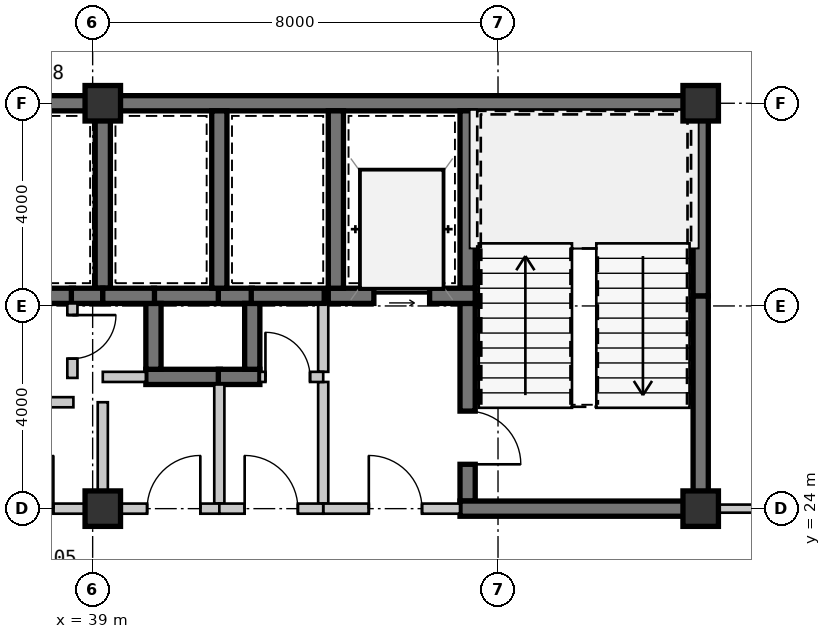
"""IFC4 building model, lengths in metres.
Left out: names, types, materials, properties, quantities, classifications, styles, units other than length and angle.
Written with IfcOpenShell. Run it as: python <this file> out.ifc"""

import sys

from ifc_helpers import new_model, si_unit, direction, frame, frame_2d, origin, origin_2d, place, context, subcontext, project, spatial, rectangle, extrude, source, transform, mapped, element, fill, save


model = new_model("IFC4")
c1 = context("Model", 3, precision=1e-05, world=origin(), true_north=direction((0.0, 1.0)))
c2 = subcontext(c1, "Body", "Model", "MODEL_VIEW")
j1 = project(units=[si_unit("LENGTHUNIT", "METRE"), si_unit("PLANEANGLEUNIT", "RADIAN")], contexts=[c1])
p1 = place(None, origin())
s1 = spatial("IfcSite", under=j1, at=p1, CompositionType="ELEMENT")
p2 = place(p1, origin())
s2 = spatial("IfcBuilding", under=s1, at=p2, CompositionType="ELEMENT")
p3 = place(p2, frame((0.0, 0.0, 80.85)))
s3 = spatial("IfcBuildingStorey", under=s2, at=p3, CompositionType="ELEMENT", Elevation=80.85)
m1 = source(origin(), c2, "Body", "SweptSolid", [
    extrude(rectangle(XDim=0.7, YDim=0.7, at=origin_2d()), origin(), (0.0, 0.0, 1.0), 3.15),
])
for number, where, z_axis, x_axis in (
    (1, (39.2, 24.0, 0.0), (0.0, 0.0, 1.0), (1.0, 0.0, 0.0)),
    (2, (51.0, 24.0, 0.0), (0.0, 0.0, 1.0), (1.0, 0.0, 0.0)),
    (3, (39.2, 32.0, 0.0), (0.0, 0.0, 1.0), (1.0, 0.0, 0.0)),
    (4, (51.0, 32.0, 0.0), (0.0, 0.0, 1.0), (1.0, 0.0, 0.0)),
):
    element("IfcColumn", number, at=place(p3, frame(where, z_axis=z_axis, x_axis=x_axis)), inside=s3, PredefinedType="COLUMN", context=c2, shape_type="MappedRepresentation", body=[
        mapped(m1, transform((0.0, 0.0, 0.0), scale=1.0)),
    ])
m2 = source(origin(), c2, "Body", "SweptSolid", [
    extrude(rectangle(XDim=11.2, YDim=0.3, at=frame_2d((5.6, 0.0))), origin(), (0.0, 0.0, 1.0), 2.93),
])
p4 = place(p3, frame((28.0, 32.0, 0.0), z_axis=(0.0, 0.0, 1.0), x_axis=(1.0, 0.0, 0.0)))
e5 = element("IfcWall", 5, at=p4, inside=s3, PredefinedType="SHEAR", context=c2, shape_type="MappedRepresentation", body=[
    mapped(m2, transform((0.0, 0.0, 0.0), scale=1.0)),
])
m3 = source(origin(), c2, "Body", "SweptSolid", [
    extrude(rectangle(XDim=11.95, YDim=0.3, at=frame_2d((5.975, 0.0))), origin(), (0.0, 0.0, 1.0), 2.93),
])
p5 = place(p3, frame((39.2, 32.0, 0.0), z_axis=(0.0, 0.0, 1.0), x_axis=(1.0, 0.0, 0.0)))
e6 = element("IfcWall", 6, at=p5, inside=s3, PredefinedType="SHEAR", context=c2, shape_type="MappedRepresentation", body=[
    mapped(m3, transform((0.0, 0.0, 0.0), scale=1.0)),
])
m4 = source(origin(), c2, "Body", "SweptSolid", [
    extrude(rectangle(XDim=4.05, YDim=0.3, at=frame_2d((2.025, 0.0))), origin(), (0.0, 0.0, 1.0), 2.93),
])
p6 = place(p3, frame((51.0, 24.15, 0.0), z_axis=(0.0, 0.0, 1.0), x_axis=(0.0, 1.0, 0.0)))
e7 = element("IfcWall", 7, at=p6, inside=s3, PredefinedType="SHEAR", context=c2, shape_type="MappedRepresentation", body=[
    mapped(m4, transform((0.0, 0.0, 0.0), scale=1.0)),
])
m5 = source(origin(), c2, "Body", "SweptSolid", [
    extrude(rectangle(XDim=3.65, YDim=0.3, at=frame_2d((1.825, 0.0))), origin(), (0.0, 0.0, 1.0), 2.93),
])
p7 = place(p3, frame((51.0, 28.2, 0.0), z_axis=(0.0, 0.0, 1.0), x_axis=(0.0, 1.0, 0.0)))
e8 = element("IfcWall", 8, at=p7, inside=s3, PredefinedType="SHEAR", context=c2, shape_type="MappedRepresentation", body=[
    mapped(m5, transform((0.0, 0.0, 0.0), scale=1.0)),
])
m6 = source(origin(), c2, "Body", "SweptSolid", [
    extrude(rectangle(XDim=3.5, YDim=0.3, at=frame_2d((1.75, 0.0))), origin(), (0.0, 0.0, 1.0), 2.93),
])
p8 = place(p3, frame((46.4, 31.85, 0.0), z_axis=(0.0, 0.0, 1.0), x_axis=(0.0, -1.0, 0.0)))
e9 = element("IfcWall", 9, at=p8, inside=s3, PredefinedType="SHEAR", context=c2, shape_type="MappedRepresentation", body=[
    mapped(m6, transform((0.0, 0.0, 0.0), scale=1.0)),
])
m7 = source(origin(), c2, "Body", "SweptSolid", [
    extrude(rectangle(XDim=3.9, YDim=0.3, at=frame_2d((1.95, 0.0))), origin(), (0.0, 0.0, 1.0), 2.93),
])
p9 = place(p3, frame((46.4, 28.05, 0.0), z_axis=(0.0, 0.0, 1.0), x_axis=(0.0, -1.0, 0.0)))
e10 = element("IfcWall", 10, at=p9, inside=s3, PredefinedType="SHEAR", context=c2, shape_type="MappedRepresentation", body=[
    mapped(m7, transform((0.0, 0.0, 0.0), scale=1.0)),
])
m8 = source(origin(), c2, "Body", "SweptSolid", [
    extrude(rectangle(XDim=1.05, YDim=2.1, at=frame_2d((0.525, 1.05))), frame((0.0, 0.16, 0.0), z_axis=(0.0, -1.0, 0.0), x_axis=(1.0, 0.0, 0.0)), (0.0, 0.0, 1.0), 0.32),
])
p10 = place(p9, frame((2.125, 0.0, 0.0)))
e11 = element("IfcOpeningElement", 11, at=p10, cuts=e10, PredefinedType="OPENING", context=c2, shape_type="MappedRepresentation", body=[
    mapped(m8, transform((0.0, 0.0, 0.0), scale=1.0)),
])
m9 = source(origin(), c2, "Body", "SweptSolid", [
    extrude(rectangle(XDim=4.9, YDim=0.3, at=frame_2d((2.45, 0.0))), origin(), (0.0, 0.0, 1.0), 2.93),
])
p11 = place(p3, frame((46.25, 24.0, 0.0), z_axis=(0.0, 0.0, 1.0), x_axis=(1.0, 0.0, 0.0)))
e12 = element("IfcWall", 12, at=p11, inside=s3, PredefinedType="SHEAR", context=c2, shape_type="MappedRepresentation", body=[
    mapped(m9, transform((0.0, 0.0, 0.0), scale=1.0)),
])
m10 = source(origin(), c2, "Body", "SweptSolid", [
    extrude(rectangle(XDim=2.9, YDim=0.3, at=frame_2d((1.45, 0.0))), origin(), (0.0, 0.0, 1.0), 2.93),
])
p12 = place(p3, frame((43.65, 28.2, 0.0), z_axis=(0.0, 0.0, 1.0), x_axis=(1.0, 0.0, 0.0)))
e13 = element("IfcWall", 13, at=p12, inside=s3, PredefinedType="SHEAR", context=c2, shape_type="MappedRepresentation", body=[
    mapped(m10, transform((0.0, 0.0, 0.0), scale=1.0)),
])
m11 = source(origin(), c2, "Body", "SweptSolid", [
    extrude(rectangle(XDim=1.1, YDim=2.15, at=frame_2d((0.55, 1.075))), frame((0.0, 0.16, 0.0), z_axis=(0.0, -1.0, 0.0), x_axis=(1.0, 0.0, 0.0)), (0.0, 0.0, 1.0), 0.32),
])
p13 = place(p12, frame((0.9, 0.0, 0.0)))
e14 = element("IfcOpeningElement", 14, at=p13, cuts=e13, PredefinedType="OPENING", context=c2, shape_type="MappedRepresentation", body=[
    mapped(m11, transform((0.0, 0.0, 0.0), scale=1.0)),
])
p14 = place(p3, frame((43.8, 31.85, 0.0), z_axis=(0.0, 0.0, 1.0), x_axis=(0.0, -1.0, 0.0)))
e15 = element("IfcWall", 15, at=p14, inside=s3, PredefinedType="SHEAR", context=c2, shape_type="MappedRepresentation", body=[
    mapped(m6, transform((0.0, 0.0, 0.0), scale=1.0)),
])
m12 = source(origin(), c2, "Body", "SweptSolid", [
    extrude(rectangle(XDim=2.4, YDim=0.2, at=frame_2d((1.2, 0.0))), origin(), (0.0, 0.0, 1.0), 2.93),
])
p15 = place(p3, frame((43.55, 26.5, 0.0), z_axis=(0.0, 0.0, 1.0), x_axis=(0.0, -1.0, 0.0)))
e16 = element("IfcWall", 16, at=p15, inside=s3, PredefinedType="SOLIDWALL", context=c2, shape_type="MappedRepresentation", body=[
    mapped(m12, transform((0.0, 0.0, 0.0), scale=1.0)),
])
m13 = source(origin(), c2, "Body", "SweptSolid", [
    extrude(rectangle(XDim=1.35, YDim=0.2, at=frame_2d((0.675, 0.0))), origin(), (0.0, 0.0, 1.0), 2.93),
])
p16 = place(p3, frame((43.55, 28.05, 0.0), z_axis=(0.0, 0.0, 1.0), x_axis=(0.0, -1.0, 0.0)))
e17 = element("IfcWall", 17, at=p16, inside=s3, PredefinedType="SOLIDWALL", context=c2, shape_type="MappedRepresentation", body=[
    mapped(m13, transform((0.0, 0.0, 0.0), scale=1.0)),
])
m14 = source(origin(), c2, "Body", "SweptSolid", [
    extrude(rectangle(XDim=2.7, YDim=0.2, at=frame_2d((1.35, 0.0))), origin(), (0.0, 0.0, 1.0), 2.397),
])
p17 = place(p3, frame((43.55, 24.0, 0.0), z_axis=(0.0, 0.0, 1.0), x_axis=(1.0, 0.0, 0.0)))
e18 = element("IfcWall", 18, at=p17, inside=s3, PredefinedType="SOLIDWALL", context=c2, shape_type="MappedRepresentation", body=[
    mapped(m14, transform((0.0, 0.0, 0.0), scale=1.0)),
])
m15 = source(origin(), c2, "Body", "SweptSolid", [
    extrude(rectangle(XDim=1.05, YDim=2.1, at=frame_2d((0.525, 1.05))), frame((0.0, 0.11, 0.0), z_axis=(0.0, -1.0, 0.0), x_axis=(1.0, 0.0, 0.0)), (0.0, 0.0, 1.0), 0.22),
])
p18 = place(p17, frame((0.9, 0.0, 0.0)))
e19 = element("IfcOpeningElement", 19, at=p18, cuts=e18, PredefinedType="OPENING", context=c2, shape_type="MappedRepresentation", body=[
    mapped(m15, transform((0.0, 0.0, 0.0), scale=1.0)),
])
m16 = source(origin(), c2, "Body", "SweptSolid", [
    extrude(rectangle(XDim=1.32, YDim=0.3, at=frame_2d((0.66, 0.0))), origin(), (0.0, 0.0, 1.0), 2.93),
])
p19 = place(p3, frame((41.52, 28.2, 0.0), z_axis=(0.0, 0.0, 1.0), x_axis=(-1.0, 0.0, 0.0)))
e20 = element("IfcWall", 20, at=p19, inside=s3, PredefinedType="SHEAR", context=c2, shape_type="MappedRepresentation", body=[
    mapped(m16, transform((0.0, 0.0, 0.0), scale=1.0)),
])
m17 = source(origin(), c2, "Body", "SweptSolid", [
    extrude(rectangle(XDim=0.67, YDim=0.3, at=frame_2d((0.335, 0.0))), origin(), (0.0, 0.0, 1.0), 2.93),
])
p20 = place(p3, frame((42.15, 28.2, 0.0), z_axis=(0.0, 0.0, 1.0), x_axis=(-1.0, 0.0, 0.0)))
e21 = element("IfcWall", 21, at=p20, inside=s3, PredefinedType="SHEAR", context=c2, shape_type="MappedRepresentation", body=[
    mapped(m17, transform((0.0, 0.0, 0.0), scale=1.0)),
])
m18 = source(origin(), c2, "Body", "SweptSolid", [
    extrude(rectangle(XDim=1.47, YDim=0.3, at=frame_2d((0.735, 0.0))), origin(), (0.0, 0.0, 1.0), 2.93),
])
p21 = place(p3, frame((40.05, 26.6, 0.0), z_axis=(0.0, 0.0, 1.0), x_axis=(1.0, 0.0, 0.0)))
e22 = element("IfcWall", 22, at=p21, inside=s3, PredefinedType="SHEAR", context=c2, shape_type="MappedRepresentation", body=[
    mapped(m18, transform((0.0, 0.0, 0.0), scale=1.0)),
])
m19 = source(origin(), c2, "Body", "SweptSolid", [
    extrude(rectangle(XDim=1.3, YDim=0.3, at=frame_2d((0.65, 0.0))), origin(), (0.0, 0.0, 1.0), 2.93),
])
p22 = place(p3, frame((40.2, 28.05, 0.0), z_axis=(0.0, 0.0, 1.0), x_axis=(0.0, -1.0, 0.0)))
e23 = element("IfcWall", 23, at=p22, inside=s3, PredefinedType="SHEAR", context=c2, shape_type="MappedRepresentation", body=[
    mapped(m19, transform((0.0, 0.0, 0.0), scale=1.0)),
])
m20 = source(origin(), c2, "Body", "SweptSolid", [
    extrude(rectangle(XDim=0.82, YDim=0.3, at=frame_2d((0.41, 0.0))), origin(), (0.0, 0.0, 1.0), 2.93),
])
p23 = place(p3, frame((41.48, 26.6, 0.0), z_axis=(0.0, 0.0, 1.0), x_axis=(1.0, 0.0, 0.0)))
e24 = element("IfcWall", 24, at=p23, inside=s3, PredefinedType="SHEAR", context=c2, shape_type="MappedRepresentation", body=[
    mapped(m20, transform((0.0, 0.0, 0.0), scale=1.0)),
])
p24 = place(p3, frame((42.15, 26.75, 0.0), z_axis=(0.0, 0.0, 1.0), x_axis=(0.0, 1.0, 0.0)))
e25 = element("IfcWall", 25, at=p24, inside=s3, PredefinedType="SHEAR", context=c2, shape_type="MappedRepresentation", body=[
    mapped(m19, transform((0.0, 0.0, 0.0), scale=1.0)),
])
p25 = place(p3, frame((39.2, 28.35, 0.0), z_axis=(0.0, 0.0, 1.0), x_axis=(0.0, 1.0, 0.0)))
e26 = element("IfcWall", 26, at=p25, inside=s3, PredefinedType="SHEAR", context=c2, shape_type="MappedRepresentation", body=[
    mapped(m6, transform((0.0, 0.0, 0.0), scale=1.0)),
])
m21 = source(origin(), c2, "Body", "SweptSolid", [
    extrude(rectangle(XDim=1.92, YDim=0.3, at=frame_2d((0.96, 0.0))), origin(), (0.0, 0.0, 1.0), 2.93),
])
p26 = place(p3, frame((36.7, 28.2, 0.0), z_axis=(0.0, 0.0, 1.0), x_axis=(1.0, 0.0, 0.0)))
e27 = element("IfcWall", 27, at=p26, inside=s3, PredefinedType="SHEAR", context=c2, shape_type="MappedRepresentation", body=[
    mapped(m21, transform((0.0, 0.0, 0.0), scale=1.0)),
])
m22 = source(origin(), c2, "Body", "SweptSolid", [
    extrude(rectangle(XDim=0.62, YDim=0.3, at=frame_2d((0.31, 0.0))), origin(), (0.0, 0.0, 1.0), 2.93),
])
p27 = place(p3, frame((38.58, 28.2, 0.0), z_axis=(0.0, 0.0, 1.0), x_axis=(1.0, 0.0, 0.0)))
e28 = element("IfcWall", 28, at=p27, inside=s3, PredefinedType="SHEAR", context=c2, shape_type="MappedRepresentation", body=[
    mapped(m22, transform((0.0, 0.0, 0.0), scale=1.0)),
])
p28 = place(p3, frame((41.5, 28.35, 0.0), z_axis=(0.0, 0.0, 1.0), x_axis=(0.0, 1.0, 0.0)))
e29 = element("IfcWall", 29, at=p28, inside=s3, PredefinedType="SHEAR", context=c2, shape_type="MappedRepresentation", body=[
    mapped(m6, transform((0.0, 0.0, 0.0), scale=1.0)),
])
m23 = source(origin(), c2, "Body", "SweptSolid", [
    extrude(rectangle(XDim=1.02, YDim=0.3, at=frame_2d((0.51, 0.0))), origin(), (0.0, 0.0, 1.0), 2.93),
])
p29 = place(p3, frame((39.2, 28.2, 0.0), z_axis=(0.0, 0.0, 1.0), x_axis=(1.0, 0.0, 0.0)))
e30 = element("IfcWall", 30, at=p29, inside=s3, PredefinedType="SHEAR", context=c2, shape_type="MappedRepresentation", body=[
    mapped(m23, transform((0.0, 0.0, 0.0), scale=1.0)),
])
m24 = source(origin(), c2, "Body", "SweptSolid", [
    extrude(rectangle(XDim=1.44, YDim=0.3, at=frame_2d((0.72, 0.0))), origin(), (0.0, 0.0, 1.0), 2.93),
])
p30 = place(p3, frame((42.13, 28.2, 0.0), z_axis=(0.0, 0.0, 1.0), x_axis=(1.0, 0.0, 0.0)))
e31 = element("IfcWall", 31, at=p30, inside=s3, PredefinedType="SHEAR", context=c2, shape_type="MappedRepresentation", body=[
    mapped(m24, transform((0.0, 0.0, 0.0), scale=1.0)),
])
m25 = source(origin(), c2, "Body", "SweptSolid", [
    extrude(rectangle(XDim=2.42, YDim=0.2, at=frame_2d((1.21, 0.0))), origin(), (0.0, 0.0, 1.0), 2.93),
])
p31 = place(p3, frame((36.2, 26.1, 0.0), z_axis=(0.0, 0.0, 1.0), x_axis=(1.0, 0.0, 0.0)))
e32 = element("IfcWall", 32, at=p31, inside=s3, PredefinedType="SOLIDWALL", context=c2, shape_type="MappedRepresentation", body=[
    mapped(m25, transform((0.0, 0.0, 0.0), scale=1.0)),
])
p32 = place(p31, frame((0.685, 0.0, 0.0)))
e33 = element("IfcOpeningElement", 33, at=p32, cuts=e32, PredefinedType="OPENING", context=c2, shape_type="MappedRepresentation", body=[
    mapped(m15, transform((0.0, 0.0, 0.0), scale=1.0)),
])
m26 = source(origin(), c2, "Body", "SweptSolid", [
    extrude(rectangle(XDim=2.0, YDim=0.2, at=frame_2d((1.0, 0.0))), origin(), (0.0, 0.0, 1.0), 2.47),
])
p33 = place(p3, frame((39.2, 26.1, 0.0), z_axis=(0.0, 0.0, 1.0), x_axis=(0.0, -1.0, 0.0)))
e34 = element("IfcWall", 34, at=p33, inside=s3, PredefinedType="SOLIDWALL", context=c2, shape_type="MappedRepresentation", body=[
    mapped(m26, transform((0.0, 0.0, 0.0), scale=1.0)),
])
m27 = source(origin(), c2, "Body", "SweptSolid", [
    extrude(rectangle(XDim=3.0, YDim=0.2, at=frame_2d((1.5, 0.0))), origin(), (0.0, 0.0, 1.0), 2.47),
])
p34 = place(p3, frame((39.2, 24.0, 0.0), z_axis=(0.0, 0.0, 1.0), x_axis=(-1.0, 0.0, 0.0)))
e35 = element("IfcWall", 35, at=p34, inside=s3, PredefinedType="SOLIDWALL", context=c2, shape_type="MappedRepresentation", body=[
    mapped(m27, transform((0.0, 0.0, 0.0), scale=1.0)),
])
p35 = place(p34, frame((0.975, 0.0, 0.0)))
e36 = element("IfcOpeningElement", 36, at=p35, cuts=e35, PredefinedType="OPENING", context=c2, shape_type="MappedRepresentation", body=[
    mapped(m15, transform((0.0, 0.0, 0.0), scale=1.0)),
])
m28 = source(origin(), c2, "Body", "SweptSolid", [
    extrude(rectangle(XDim=1.47, YDim=0.2, at=frame_2d((0.735, 0.0))), origin(), (0.0, 0.0, 1.0), 2.93),
])
p36 = place(p3, frame((38.6, 28.05, 0.0), z_axis=(0.0, 0.0, 1.0), x_axis=(0.0, -1.0, 0.0)))
e37 = element("IfcWall", 37, at=p36, inside=s3, PredefinedType="SOLIDWALL", context=c2, shape_type="MappedRepresentation", body=[
    mapped(m28, transform((0.0, 0.0, 0.0), scale=1.0)),
])
m29 = source(origin(), c2, "Body", "SweptSolid", [
    extrude(rectangle(XDim=0.86, YDim=2.1, at=frame_2d((0.43, 1.05))), frame((0.0, 0.11, 0.0), z_axis=(0.0, -1.0, 0.0), x_axis=(1.0, 0.0, 0.0)), (0.0, 0.0, 1.0), 0.22),
])
p37 = place(p36, frame((0.23, 0.0, 0.0)))
e38 = element("IfcOpeningElement", 38, at=p37, cuts=e37, PredefinedType="OPENING", context=c2, shape_type="MappedRepresentation", body=[
    mapped(m29, transform((0.0, 0.0, 0.0), scale=1.0)),
])
m30 = source(origin(), c2, "Body", "SweptSolid", [
    extrude(rectangle(XDim=0.85, YDim=0.2, at=frame_2d((0.425, 0.0))), origin(), (0.0, 0.0, 1.0), 2.93),
])
p38 = place(p3, frame((39.2, 26.6, 0.0), z_axis=(0.0, 0.0, 1.0), x_axis=(1.0, 0.0, 0.0)))
e39 = element("IfcWall", 39, at=p38, inside=s3, PredefinedType="SOLIDWALL", context=c2, shape_type="MappedRepresentation", body=[
    mapped(m30, transform((0.0, 0.0, 0.0), scale=1.0)),
])
m31 = source(origin(), c2, "Body", "SweptSolid", [
    extrude(rectangle(XDim=2.35, YDim=0.2, at=frame_2d((1.175, 0.0))), origin(), (0.0, 0.0, 1.0), 2.93),
])
p39 = place(p3, frame((41.5, 26.45, 0.0), z_axis=(0.0, 0.0, 1.0), x_axis=(0.0, -1.0, 0.0)))
e40 = element("IfcWall", 40, at=p39, inside=s3, PredefinedType="SOLIDWALL", context=c2, shape_type="MappedRepresentation", body=[
    mapped(m31, transform((0.0, 0.0, 0.0), scale=1.0)),
])
m32 = source(origin(), c2, "Body", "SweptSolid", [
    extrude(rectangle(XDim=2.3, YDim=0.2, at=frame_2d((1.15, 0.0))), origin(), (0.0, 0.0, 1.0), 2.397),
])
p40 = place(p3, frame((41.5, 24.0, 0.0), z_axis=(0.0, 0.0, 1.0), x_axis=(-1.0, 0.0, 0.0)))
e41 = element("IfcWall", 41, at=p40, inside=s3, PredefinedType="SOLIDWALL", context=c2, shape_type="MappedRepresentation", body=[
    mapped(m32, transform((0.0, 0.0, 0.0), scale=1.0)),
])
p41 = place(p40, frame((0.375, 0.0, 0.0)))
e42 = element("IfcOpeningElement", 42, at=p41, cuts=e41, PredefinedType="OPENING", context=c2, shape_type="MappedRepresentation", body=[
    mapped(m15, transform((0.0, 0.0, 0.0), scale=1.0)),
])
m33 = source(origin(), c2, "Body", "SweptSolid", [
    extrude(rectangle(XDim=1.25, YDim=0.2, at=frame_2d((0.625, 0.0))), origin(), (0.0, 0.0, 1.0), 2.93),
])
p42 = place(p3, frame((42.3, 26.6, 0.0), z_axis=(0.0, 0.0, 1.0), x_axis=(1.0, 0.0, 0.0)))
e43 = element("IfcWall", 43, at=p42, inside=s3, PredefinedType="SOLIDWALL", context=c2, shape_type="MappedRepresentation", body=[
    mapped(m33, transform((0.0, 0.0, 0.0), scale=1.0)),
])
m34 = source(origin(), c2, "Body", "SweptSolid", [
    extrude(rectangle(XDim=0.88, YDim=2.1, at=frame_2d((0.44, 1.05))), frame((0.0, 0.11, 0.0), z_axis=(0.0, -1.0, 0.0), x_axis=(1.0, 0.0, 0.0)), (0.0, 0.0, 1.0), 0.22),
])
p43 = place(p42, frame((0.11, 0.0, 0.0)))
e44 = element("IfcOpeningElement", 44, at=p43, cuts=e43, PredefinedType="OPENING", context=c2, shape_type="MappedRepresentation", body=[
    mapped(m34, transform((0.0, 0.0, 0.0), scale=1.0)),
])
m35 = source(origin(), c2, "Body", "SweptSolid", [
    extrude(rectangle(XDim=2.05, YDim=0.2, at=frame_2d((1.025, 0.0))), origin(), (0.0, 0.0, 1.0), 2.397),
])
p44 = place(p3, frame((43.55, 24.0, 0.0), z_axis=(0.0, 0.0, 1.0), x_axis=(-1.0, 0.0, 0.0)))
e45 = element("IfcWall", 45, at=p44, inside=s3, PredefinedType="SOLIDWALL", context=c2, shape_type="MappedRepresentation", body=[
    mapped(m35, transform((0.0, 0.0, 0.0), scale=1.0)),
])
p45 = place(p44, frame((0.5, 0.0, 0.0)))
e46 = element("IfcOpeningElement", 46, at=p45, cuts=e45, PredefinedType="OPENING", context=c2, shape_type="MappedRepresentation", body=[
    mapped(m15, transform((0.0, 0.0, 0.0), scale=1.0)),
])
m36 = source(origin(), c2, "Body", "SweptSolid", [
    extrude(rectangle(XDim=1.155, YDim=0.16, at=frame_2d((0.577, 0.0))), origin(), (0.0, 0.0, 1.0), 2.328),
])
p46 = place(p3, frame((51.15, 24.0, 0.0), z_axis=(0.0, 0.0, 1.0), x_axis=(1.0, 0.0, 0.0)))
e47 = element("IfcWall", 47, at=p46, inside=s3, PredefinedType="PARTITIONING", context=c2, shape_type="MappedRepresentation", body=[
    mapped(m36, transform((0.0, 0.0, 0.0), scale=1.0)),
])
m37 = source(origin(), c2, "Body", "SweptSolid", [
    extrude(rectangle(XDim=1.05, YDim=2.1, at=frame_2d((0.525, 1.05))), frame((0.0, 0.025, 0.0), z_axis=(0.0, -1.0, 0.0), x_axis=(1.0, 0.0, 0.0)), (0.0, 0.0, 1.0), 0.05),
])
p47 = place(p10, origin())
e48 = element("IfcDoor", 48, at=p47, inside=s3, OperationType="SINGLE_SWING_RIGHT", PredefinedType="DOOR", context=c2, shape_type="MappedRepresentation", body=[
    mapped(m37, transform((0.0, 0.0, 0.0), scale=1.0)),
])
fill(e11, e48)
m38 = source(origin(), c2, "Body", "SweptSolid", [
    extrude(rectangle(XDim=1.1, YDim=2.15, at=frame_2d((0.55, 1.075))), frame((0.0, 0.025, 0.0), z_axis=(0.0, -1.0, 0.0), x_axis=(1.0, 0.0, 0.0)), (0.0, 0.0, 1.0), 0.05),
])
p48 = place(p13, origin())
e49 = element("IfcDoor", 49, at=p48, inside=s3, OperationType="SLIDING_TO_LEFT", PredefinedType="DOOR", context=c2, shape_type="MappedRepresentation", body=[
    mapped(m38, transform((0.0, 0.0, 0.0), scale=1.0)),
])
fill(e14, e49)
p49 = place(p18, origin())
e50 = element("IfcDoor", 50, at=p49, inside=s3, OperationType="SINGLE_SWING_LEFT", PredefinedType="DOOR", context=c2, shape_type="MappedRepresentation", body=[
    mapped(m37, transform((0.0, 0.0, 0.0), scale=1.0)),
])
fill(e19, e50)
p50 = place(p35, frame((1.05, 0.0, 0.0), z_axis=(0.0, 0.0, 1.0), x_axis=(-1.0, 0.0, 0.0)))
e51 = element("IfcDoor", 51, at=p50, inside=s3, OperationType="SINGLE_SWING_RIGHT", PredefinedType="DOOR", context=c2, shape_type="MappedRepresentation", body=[
    mapped(m37, transform((0.0, 0.0, 0.0), scale=1.0)),
])
fill(e36, e51)
p51 = place(p41, frame((1.05, 0.0, 0.0), z_axis=(0.0, 0.0, 1.0), x_axis=(-1.0, 0.0, 0.0)))
e52 = element("IfcDoor", 52, at=p51, inside=s3, OperationType="SINGLE_SWING_RIGHT", PredefinedType="DOOR", context=c2, shape_type="MappedRepresentation", body=[
    mapped(m37, transform((0.0, 0.0, 0.0), scale=1.0)),
])
fill(e42, e52)
m39 = source(origin(), c2, "Body", "SweptSolid", [
    extrude(rectangle(XDim=0.88, YDim=2.1, at=frame_2d((0.44, 1.05))), frame((0.0, 0.025, 0.0), z_axis=(0.0, -1.0, 0.0), x_axis=(1.0, 0.0, 0.0)), (0.0, 0.0, 1.0), 0.05),
])
p52 = place(p43, origin())
e53 = element("IfcDoor", 53, at=p52, inside=s3, OperationType="SINGLE_SWING_LEFT", PredefinedType="DOOR", context=c2, shape_type="MappedRepresentation", body=[
    mapped(m39, transform((0.0, 0.0, 0.0), scale=1.0)),
])
fill(e44, e53)
p53 = place(p45, frame((1.05, 0.0, 0.0), z_axis=(0.0, 0.0, 1.0), x_axis=(-1.0, 0.0, 0.0)))
e54 = element("IfcDoor", 54, at=p53, inside=s3, OperationType="SINGLE_SWING_LEFT", PredefinedType="DOOR", context=c2, shape_type="MappedRepresentation", body=[
    mapped(m37, transform((0.0, 0.0, 0.0), scale=1.0)),
])
fill(e46, e54)
m40 = source(origin(), c2, "Body", "SweptSolid", [
    extrude(rectangle(XDim=0.86, YDim=2.1, at=frame_2d((0.43, 1.05))), frame((0.0, 0.025, 0.0), z_axis=(0.0, -1.0, 0.0), x_axis=(1.0, 0.0, 0.0)), (0.0, 0.0, 1.0), 0.05),
])
p54 = place(p37, origin())
e55 = element("IfcDoor", 55, at=p54, inside=s3, OperationType="SINGLE_SWING_LEFT", PredefinedType="DOOR", context=c2, shape_type="MappedRepresentation", body=[
    mapped(m40, transform((0.0, 0.0, 0.0), scale=1.0)),
])
fill(e38, e55)
save(model, sys.argv[1])
